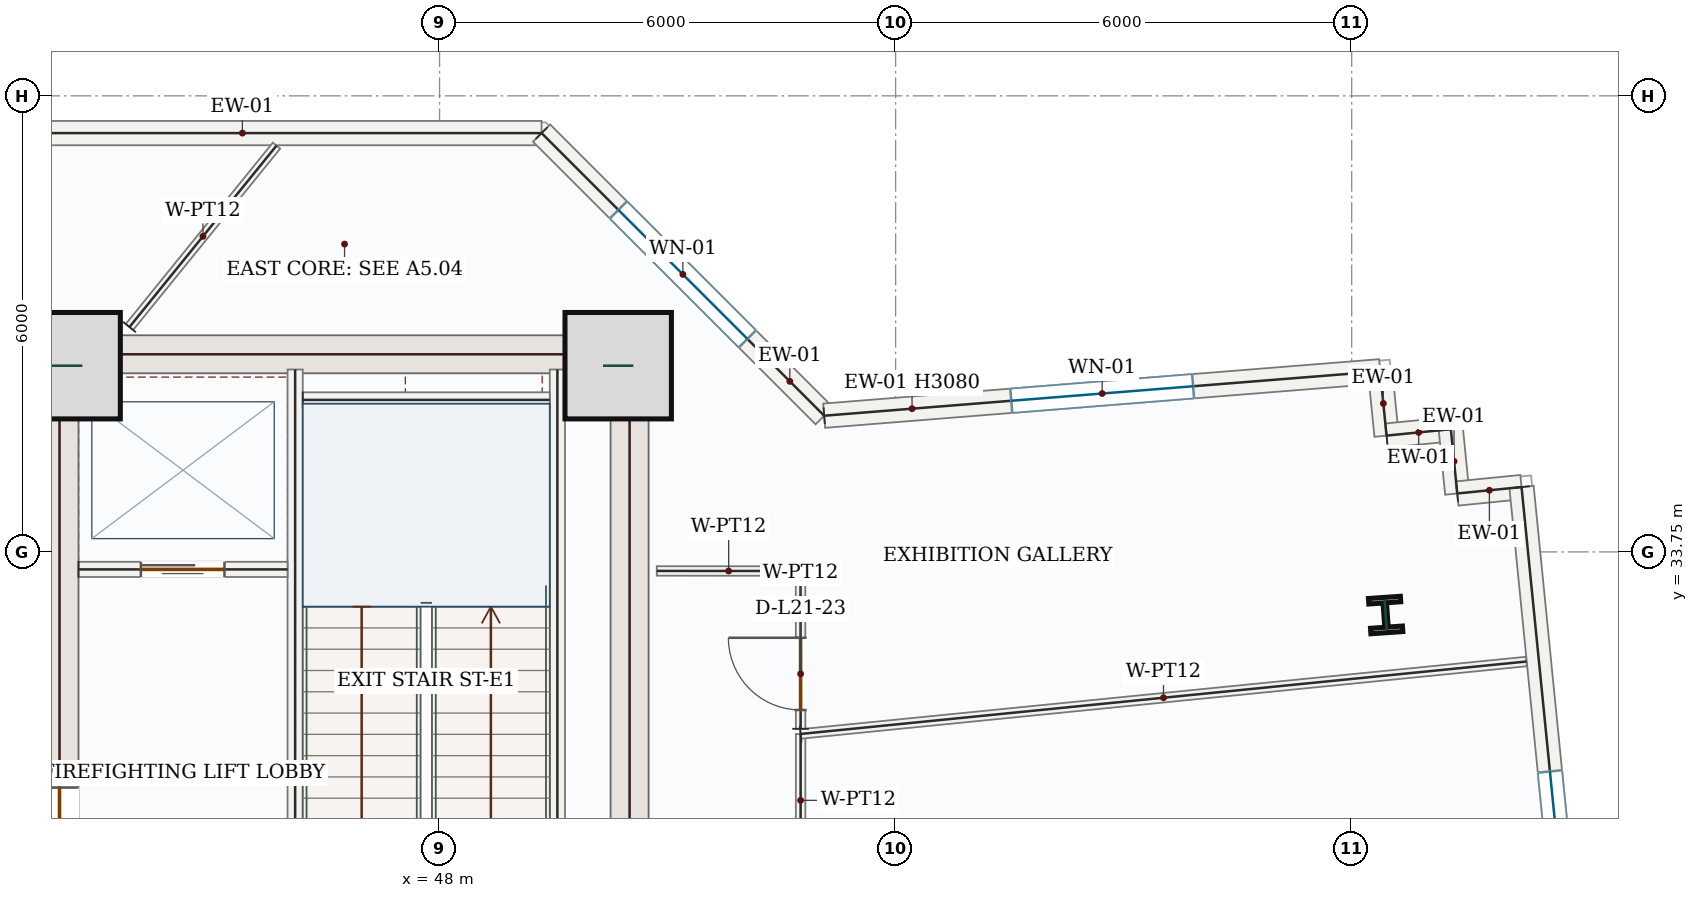
"""IFC4 building model, lengths in metres.
Left out: names, types, materials, properties, quantities, classifications, styles, units other than length and angle.
Written with IfcOpenShell. Run it as: python <this file> out.ifc"""

import sys

from ifc_helpers import new_model, si_unit, direction, frame, frame_2d, origin, origin_2d, place, context, subcontext, project, spatial, rectangle, i_section, extrude, source, transform, mapped, element, fill, save


model = new_model("IFC4")
c1 = context("Model", 3, precision=1e-05, world=origin(), true_north=direction((0.0, 1.0)))
c2 = subcontext(c1, "Body", "Model", "MODEL_VIEW")
j1 = project(units=[si_unit("LENGTHUNIT", "METRE"), si_unit("PLANEANGLEUNIT", "RADIAN")], contexts=[c1])
p1 = place(None, origin())
s1 = spatial("IfcSite", under=j1, at=p1, CompositionType="ELEMENT")
p2 = place(p1, origin())
s2 = spatial("IfcBuilding", under=s1, at=p2, CompositionType="ELEMENT")
p3 = place(p2, frame((0.0, 0.0, 96.3)))
s3 = spatial("IfcBuildingStorey", under=s2, at=p3, CompositionType="ELEMENT", Elevation=96.3)
p4 = place(p3, frame((43.0, 28.05, 0.0), z_axis=(0.0, 0.0, 1.0), x_axis=(0.0, 1.0, 0.0)))
e1 = element("IfcWall", 1, at=p4, inside=s3, PredefinedType="SHEAR", context=c2, shape_type="SweptSolid", body=[
    extrude(rectangle(XDim=8.55, YDim=0.5, at=frame_2d((4.275, 0.0))), origin(), (0.0, 0.0, 1.0), 3.95),
])
p5 = place(p4, frame((1.5, 0.0, 0.0)))
e2 = element("IfcOpeningElement", 2, at=p5, cuts=e1, PredefinedType="OPENING", context=c2, shape_type="SweptSolid", body=[
    extrude(rectangle(XDim=1.1, YDim=2.2, at=frame_2d((0.55, 1.1))), frame((0.0, 0.26, 0.0), z_axis=(0.0, -1.0, 0.0), x_axis=(1.0, 0.0, 0.0)), (0.0, 0.0, 1.0), 0.52),
])
m1 = source(origin(), c2, "Body", "SweptSolid", [
    extrude(rectangle(XDim=8.55, YDim=0.5, at=frame_2d((4.275, 0.0))), origin(), (0.0, 0.0, 1.0), 3.95),
])
p6 = place(p3, frame((50.5, 28.05, 0.0), z_axis=(0.0, 0.0, 1.0), x_axis=(0.0, 1.0, 0.0)))
e3 = element("IfcWall", 3, at=p6, inside=s3, PredefinedType="SHEAR", context=c2, shape_type="MappedRepresentation", body=[
    mapped(m1, transform((0.0, 0.0, 0.0), x_axis=(1.0, 0.0, 0.0), y_axis=(0.0, 1.0, 0.0), z_axis=(0.0, 0.0, 1.0), scale=1.0)),
])
m2 = source(origin(), c2, "Body", "SweptSolid", [
    extrude(rectangle(XDim=7.0, YDim=0.5, at=frame_2d((3.5, 0.0))), origin(), (0.0, 0.0, 1.0), 3.95),
])
p7 = place(p3, frame((43.25, 36.35, 0.0), z_axis=(0.0, 0.0, 1.0), x_axis=(1.0, 0.0, 0.0)))
e4 = element("IfcWall", 4, at=p7, inside=s3, PredefinedType="SHEAR", context=c2, shape_type="MappedRepresentation", body=[
    mapped(m2, transform((0.0, 0.0, 0.0), x_axis=(1.0, 0.0, 0.0), y_axis=(0.0, 1.0, 0.0), z_axis=(0.0, 0.0, 1.0), scale=1.0)),
])
m3 = source(origin(), c2, "Body", "SweptSolid", [
    extrude(rectangle(XDim=1.4, YDim=1.4, at=origin_2d()), origin(), (0.0, 0.0, 1.0), 4.2),
])
for number, where, z_axis, x_axis in (
    (5, (43.1, 36.2, 0.0), (0.0, 0.0, 1.0), (1.0, 0.0, 0.0)),
    (6, (50.35, 36.2, 0.0), (0.0, 0.0, 1.0), (1.0, 0.0, 0.0)),
):
    element("IfcColumn", number, at=place(p3, frame(where, z_axis=z_axis, x_axis=x_axis)), inside=s3, PredefinedType="COLUMN", context=c2, shape_type="MappedRepresentation", body=[
        mapped(m3, transform((0.0, 0.0, 0.0), x_axis=(1.0, 0.0, 0.0), y_axis=(0.0, 1.0, 0.0), z_axis=(0.0, 0.0, 1.0), scale=1.0)),
    ])
m4 = source(origin(), c2, "Body", "SweptSolid", [
    extrude(i_section(OverallWidth=0.421, OverallDepth=0.465, WebThickness=0.045, FlangeThickness=0.073, FilletRadius=0.018, at=origin_2d()), origin(), (0.0, 0.0, 1.0), 4.2),
])
p8 = place(p3, frame((60.447, 32.92, 0.0), z_axis=(0.0, 0.0, 1.0), x_axis=(0.99756405026, 0.069756473744, 0.0)))
e7 = element("IfcColumn", 7, at=p8, inside=s3, PredefinedType="COLUMN", context=c2, shape_type="MappedRepresentation", body=[
    mapped(m4, transform((0.0, 0.0, 0.0), x_axis=(1.0, 0.0, 0.0), y_axis=(0.0, 1.0, 0.0), z_axis=(0.0, 0.0, 1.0), scale=1.0)),
])
m5 = source(origin(), c2, "Body", "SweptSolid", [
    extrude(rectangle(XDim=7.873, YDim=0.32, at=frame_2d((3.936, 0.0))), origin(), (0.0, 0.0, 1.0), 3.95),
])
p9 = place(p3, frame((41.469, 39.26, 0.0), z_axis=(0.0, 0.0, 1.0), x_axis=(1.0, 0.0, 0.0)))
e8 = element("IfcWall", 8, at=p9, inside=s3, PredefinedType="SOLIDWALL", context=c2, shape_type="MappedRepresentation", body=[
    mapped(m5, transform((0.0, 0.0, 0.0), x_axis=(1.0, 0.0, 0.0), y_axis=(0.0, 1.0, 0.0), z_axis=(0.0, 0.0, 1.0), scale=1.0)),
])
p10 = place(p3, frame((49.342, 39.26, 0.0), z_axis=(0.0, 0.0, 1.0), x_axis=(0.707106781187, -0.707106781187, 0.0)))
e9 = element("IfcWall", 9, at=p10, inside=s3, PredefinedType="SOLIDWALL", context=c2, shape_type="SweptSolid", body=[
    extrude(rectangle(XDim=5.258, YDim=0.32, at=frame_2d((2.629, 0.0))), origin(), (0.0, 0.0, 1.0), 3.95),
])
p11 = place(p10, frame((1.429, 0.0, 0.85)))
e10 = element("IfcOpeningElement", 10, at=p11, cuts=e9, PredefinedType="OPENING", context=c2, shape_type="SweptSolid", body=[
    extrude(rectangle(XDim=2.4, YDim=1.8, at=frame_2d((1.2, 0.9))), frame((0.0, 0.17, 0.0), z_axis=(0.0, -1.0, 0.0), x_axis=(1.0, 0.0, 0.0)), (0.0, 0.0, 1.0), 0.34),
])
p12 = place(p3, frame((53.06, 35.542, 0.0), z_axis=(0.0, 0.0, 1.0), x_axis=(0.996827539556, 0.079591811023, 0.0)))
e11 = element("IfcWall", 11, at=p12, inside=s3, PredefinedType="SOLIDWALL", context=c2, shape_type="SweptSolid", body=[
    extrude(rectangle(XDim=7.337, YDim=0.32, at=frame_2d((3.668, 0.0))), origin(), (0.0, 0.0, 1.0), 3.08),
])
p13 = place(p12, frame((2.469, 0.0, 0.85)))
e12 = element("IfcOpeningElement", 12, at=p13, cuts=e11, PredefinedType="OPENING", context=c2, shape_type="SweptSolid", body=[
    extrude(rectangle(XDim=2.4, YDim=1.8, at=frame_2d((1.2, 0.9))), frame((0.0, 0.17, 0.0), z_axis=(0.0, -1.0, 0.0), x_axis=(1.0, 0.0, 0.0)), (0.0, 0.0, 1.0), 0.34),
])
m6 = source(origin(), c2, "Body", "SweptSolid", [
    extrude(rectangle(XDim=0.85, YDim=0.32, at=frame_2d((0.425, 0.0))), origin(), (0.0, 0.0, 1.0), 3.95),
])
p14 = place(p3, frame((60.374, 36.126, 0.0), z_axis=(0.0, 0.0, 1.0), x_axis=(0.09938995433, -0.995048560111, 0.0)))
e13 = element("IfcWall", 13, at=p14, inside=s3, PredefinedType="SOLIDWALL", context=c2, shape_type="MappedRepresentation", body=[
    mapped(m6, transform((0.0, 0.0, 0.0), x_axis=(1.0, 0.0, 0.0), y_axis=(0.0, 1.0, 0.0), z_axis=(0.0, 0.0, 1.0), scale=1.0)),
])
m7 = source(origin(), c2, "Body", "SweptSolid", [
    extrude(rectangle(XDim=0.85, YDim=0.32, at=frame_2d((0.425, 0.0))), origin(), (0.0, 0.0, 1.0), 3.95),
])
p15 = place(p3, frame((60.458, 35.28, 0.0), z_axis=(0.0, 0.0, 1.0), x_axis=(0.995079749343, 0.09907720448, 0.0)))
e14 = element("IfcWall", 14, at=p15, inside=s3, PredefinedType="SOLIDWALL", context=c2, shape_type="MappedRepresentation", body=[
    mapped(m7, transform((0.0, 0.0, 0.0), x_axis=(1.0, 0.0, 0.0), y_axis=(0.0, 1.0, 0.0), z_axis=(0.0, 0.0, 1.0), scale=1.0)),
])
for number, where, z_axis, x_axis in (
    (15, (61.304, 35.365, 0.0), (0.0, 0.0, 1.0), (0.099, -0.995, 0.0)),
    (16, (61.389, 34.519, 0.0), (0.0, 0.0, 1.0), (0.995, 0.099, 0.0)),
):
    element("IfcWall", number, at=place(p3, frame(where, z_axis=z_axis, x_axis=x_axis)), inside=s3, PredefinedType="SOLIDWALL", context=c2, shape_type="MappedRepresentation", body=[
        mapped(m6, transform((0.0, 0.0, 0.0), x_axis=(1.0, 0.0, 0.0), y_axis=(0.0, 1.0, 0.0), z_axis=(0.0, 0.0, 1.0), scale=1.0)),
    ])
p16 = place(p3, frame((62.235, 34.603, 0.0), z_axis=(0.0, 0.0, 1.0), x_axis=(0.099303907908, -0.995057151059, 0.0)))
e17 = element("IfcWall", 17, at=p16, inside=s3, PredefinedType="SOLIDWALL", context=c2, shape_type="SweptSolid", body=[
    extrude(rectangle(XDim=9.92, YDim=0.32, at=frame_2d((4.96, 0.0))), origin(), (0.0, 0.0, 1.0), 3.95),
])
p17 = place(p16, frame((3.76, 0.0, 0.85)))
e18 = element("IfcOpeningElement", 18, at=p17, cuts=e17, PredefinedType="OPENING", context=c2, shape_type="SweptSolid", body=[
    extrude(rectangle(XDim=2.4, YDim=1.8, at=frame_2d((1.2, 0.9))), frame((0.0, 0.17, 0.0), z_axis=(0.0, -1.0, 0.0), x_axis=(1.0, 0.0, 0.0)), (0.0, 0.0, 1.0), 0.34),
])
m8 = source(origin(), c2, "Body", "SweptSolid", [
    extrude(rectangle(XDim=7.87, YDim=0.2, at=frame_2d((3.935, 0.0))), origin(), (0.0, 0.0, 1.0), 3.95),
])
p18 = place(p3, frame((49.55, 28.28, 0.0), z_axis=(0.0, 0.0, 1.0), x_axis=(0.0, 1.0, 0.0)))
e19 = element("IfcWall", 19, at=p18, inside=s3, PredefinedType="SOLIDWALL", context=c2, shape_type="MappedRepresentation", body=[
    mapped(m8, transform((0.0, 0.0, 0.0), x_axis=(1.0, 0.0, 0.0), y_axis=(0.0, 1.0, 0.0), z_axis=(0.0, 0.0, 1.0), scale=1.0)),
])
p19 = place(p3, frame((46.1, 28.15, 0.0), z_axis=(0.0, 0.0, 1.0), x_axis=(0.0, 1.0, 0.0)))
e20 = element("IfcWall", 20, at=p19, inside=s3, PredefinedType="SOLIDWALL", context=c2, shape_type="SweptSolid", body=[
    extrude(rectangle(XDim=8.0, YDim=0.2, at=frame_2d((4.0, 0.0))), origin(), (0.0, 0.0, 1.0), 3.95),
])
p20 = place(p19, frame((0.4, 0.0, 0.0)))
e21 = element("IfcOpeningElement", 21, at=p20, cuts=e20, PredefinedType="OPENING", context=c2, shape_type="SweptSolid", body=[
    extrude(rectangle(XDim=1.05, YDim=2.15, at=frame_2d((0.525, 1.075))), frame((0.0, 0.11, 0.0), z_axis=(0.0, -1.0, 0.0), x_axis=(1.0, 0.0, 0.0)), (0.0, 0.0, 1.0), 0.22),
])
m9 = source(origin(), c2, "Body", "SweptSolid", [
    extrude(rectangle(XDim=3.25, YDim=0.2, at=frame_2d((1.625, 0.0))), origin(), (0.0, 0.0, 1.0), 3.95),
])
p21 = place(p3, frame((46.2, 35.75, 0.0), z_axis=(0.0, 0.0, 1.0), x_axis=(1.0, 0.0, 0.0)))
e22 = element("IfcWall", 22, at=p21, inside=s3, PredefinedType="SOLIDWALL", context=c2, shape_type="MappedRepresentation", body=[
    mapped(m9, transform((0.0, 0.0, 0.0), x_axis=(1.0, 0.0, 0.0), y_axis=(0.0, 1.0, 0.0), z_axis=(0.0, 0.0, 1.0), scale=1.0)),
])
p22 = place(p3, frame((43.25, 33.52, 0.0), z_axis=(0.0, 0.0, 1.0), x_axis=(1.0, 0.0, 0.0)))
e23 = element("IfcWall", 23, at=p22, inside=s3, PredefinedType="SOLIDWALL", context=c2, shape_type="SweptSolid", body=[
    extrude(rectangle(XDim=2.75, YDim=0.2, at=frame_2d((1.375, 0.0))), origin(), (0.0, 0.0, 1.0), 3.95),
])
p23 = place(p22, frame((0.82, 0.0, 0.0)))
e24 = element("IfcOpeningElement", 24, at=p23, cuts=e23, PredefinedType="OPENING", context=c2, shape_type="SweptSolid", body=[
    extrude(rectangle(XDim=1.1, YDim=2.15, at=frame_2d((0.55, 1.075))), frame((0.0, 0.11, 0.0), z_axis=(0.0, -1.0, 0.0), x_axis=(1.0, 0.0, 0.0)), (0.0, 0.0, 1.0), 0.22),
])
p24 = place(p3, frame((52.75, 26.612, 0.0), z_axis=(0.0, 0.0, 1.0), x_axis=(0.0, 1.0, 0.0)))
e25 = element("IfcWall", 25, at=p24, inside=s3, PredefinedType="PARTITIONING", context=c2, shape_type="SweptSolid", body=[
    extrude(rectangle(XDim=4.743, YDim=0.125, at=frame_2d((2.372, 0.0))), origin(), (0.0, 0.0, 1.0), 3.95),
])
p25 = place(p24, frame((1.897, 0.0, 0.0)))
e26 = element("IfcOpeningElement", 26, at=p25, cuts=e25, PredefinedType="OPENING", context=c2, shape_type="SweptSolid", body=[
    extrude(rectangle(XDim=0.95, YDim=2.15, at=frame_2d((0.475, 1.075))), frame((0.0, 0.073, 0.0), z_axis=(0.0, -1.0, 0.0), x_axis=(1.0, 0.0, 0.0)), (0.0, 0.0, 1.0), 0.145),
])
m10 = source(origin(), c2, "Body", "SweptSolid", [
    extrude(rectangle(XDim=9.595, YDim=0.125, at=frame_2d((4.798, 0.0))), origin(), (0.0, 0.0, 1.0), 3.95),
])
p26 = place(p3, frame((52.75, 31.355, 0.0), z_axis=(0.0, 0.0, 1.0), x_axis=(0.995054305912, 0.099332413068, 0.0)))
e27 = element("IfcWall", 27, at=p26, inside=s3, PredefinedType="PARTITIONING", context=c2, shape_type="MappedRepresentation", body=[
    mapped(m10, transform((0.0, 0.0, 0.0), x_axis=(1.0, 0.0, 0.0), y_axis=(0.0, 1.0, 0.0), z_axis=(0.0, 0.0, 1.0), scale=1.0)),
])
m11 = source(origin(), c2, "Body", "SweptSolid", [
    extrude(rectangle(XDim=3.072, YDim=0.125, at=frame_2d((1.536, 0.0))), origin(), (0.0, 0.0, 1.0), 3.95),
])
p27 = place(p3, frame((43.92, 36.709, 0.0), z_axis=(0.0, 0.0, 1.0), x_axis=(0.629760486176, 0.776789373029, 0.0)))
e28 = element("IfcWall", 28, at=p27, inside=s3, PredefinedType="PARTITIONING", context=c2, shape_type="MappedRepresentation", body=[
    mapped(m11, transform((0.0, 0.0, 0.0), x_axis=(1.0, 0.0, 0.0), y_axis=(0.0, 1.0, 0.0), z_axis=(0.0, 0.0, 1.0), scale=1.0)),
])
p28 = place(p3, frame((52.75, 31.423, 0.0), z_axis=(0.0, 0.0, 1.0), x_axis=(-0.000470366834, 0.999999889378, 0.0)))
e29 = element("IfcWall", 29, at=p28, inside=s3, PredefinedType="PARTITIONING", context=c2, shape_type="SweptSolid", body=[
    extrude(rectangle(XDim=2.076, YDim=0.125, at=frame_2d((1.038, 0.0))), origin(), (0.0, 0.0, 1.0), 3.95),
])
p29 = place(p28, frame((0.248, 0.0, 0.0)))
e30 = element("IfcOpeningElement", 30, at=p29, cuts=e29, PredefinedType="OPENING", context=c2, shape_type="SweptSolid", body=[
    extrude(rectangle(XDim=0.95, YDim=2.15, at=frame_2d((0.475, 1.075))), frame((0.0, 0.073, 0.0), z_axis=(0.0, -1.0, 0.0), x_axis=(1.0, 0.0, 0.0)), (0.0, 0.0, 1.0), 0.145),
])
m12 = source(origin(), c2, "Body", "SweptSolid", [
    extrude(rectangle(XDim=1.891, YDim=0.125, at=frame_2d((0.946, 0.0))), origin(), (0.0, 0.0, 1.0), 3.95),
])
p30 = place(p3, frame((52.749, 33.499, 0.0), z_axis=(0.0, 0.0, 1.0), x_axis=(-0.99999992502, 0.000387246647, 0.0)))
e31 = element("IfcWall", 31, at=p30, inside=s3, PredefinedType="PARTITIONING", context=c2, shape_type="MappedRepresentation", body=[
    mapped(m12, transform((0.0, 0.0, 0.0), x_axis=(1.0, 0.0, 0.0), y_axis=(0.0, 1.0, 0.0), z_axis=(0.0, 0.0, 1.0), scale=1.0)),
])
m13 = source(origin(), c2, "Body", "SweptSolid", [
    extrude(rectangle(XDim=2.4, YDim=1.8, at=frame_2d((1.2, 0.9))), frame((0.0, 0.03, 0.0), z_axis=(0.0, -1.0, 0.0), x_axis=(1.0, 0.0, 0.0)), (0.0, 0.0, 1.0), 0.06),
])
p31 = place(p11, origin())
e32 = element("IfcWindow", 32, at=p31, inside=s3, PartitioningType="DOUBLE_PANEL_VERTICAL", PredefinedType="WINDOW", context=c2, shape_type="MappedRepresentation", body=[
    mapped(m13, transform((0.0, 0.0, 0.0), x_axis=(1.0, 0.0, 0.0), y_axis=(0.0, 1.0, 0.0), z_axis=(0.0, 0.0, 1.0), scale=1.0)),
])
fill(e10, e32)
p32 = place(p13, origin())
e33 = element("IfcWindow", 33, at=p32, inside=s3, PartitioningType="DOUBLE_PANEL_VERTICAL", PredefinedType="WINDOW", context=c2, shape_type="MappedRepresentation", body=[
    mapped(m13, transform((0.0, 0.0, 0.0), x_axis=(1.0, 0.0, 0.0), y_axis=(0.0, 1.0, 0.0), z_axis=(0.0, 0.0, 1.0), scale=1.0)),
])
fill(e12, e33)
p33 = place(p17, origin())
e34 = element("IfcWindow", 34, at=p33, inside=s3, PartitioningType="DOUBLE_PANEL_VERTICAL", PredefinedType="WINDOW", context=c2, shape_type="MappedRepresentation", body=[
    mapped(m13, transform((0.0, 0.0, 0.0), x_axis=(1.0, 0.0, 0.0), y_axis=(0.0, 1.0, 0.0), z_axis=(0.0, 0.0, 1.0), scale=1.0)),
])
fill(e18, e34)
m14 = source(origin(), c2, "Body", "SweptSolid", [
    extrude(rectangle(XDim=1.1, YDim=2.15, at=frame_2d((0.55, 1.075))), frame((0.0, 0.025, 0.0), z_axis=(0.0, -1.0, 0.0), x_axis=(1.0, 0.0, 0.0)), (0.0, 0.0, 1.0), 0.05),
])
p34 = place(p23, origin())
e35 = element("IfcDoor", 35, at=p34, inside=s3, OperationType="DOUBLE_DOOR_SLIDING", PredefinedType="DOOR", context=c2, shape_type="MappedRepresentation", body=[
    mapped(m14, transform((0.0, 0.0, 0.0), x_axis=(1.0, 0.0, 0.0), y_axis=(0.0, 1.0, 0.0), z_axis=(0.0, 0.0, 1.0), scale=1.0)),
])
fill(e24, e35)
m15 = source(origin(), c2, "Body", "SweptSolid", [
    extrude(rectangle(XDim=1.1, YDim=2.2, at=frame_2d((0.55, 1.1))), frame((0.0, 0.025, 0.0), z_axis=(0.0, -1.0, 0.0), x_axis=(1.0, 0.0, 0.0)), (0.0, 0.0, 1.0), 0.05),
])
p35 = place(p5, origin())
e36 = element("IfcDoor", 36, at=p35, inside=s3, OperationType="SINGLE_SWING_LEFT", PredefinedType="DOOR", context=c2, shape_type="MappedRepresentation", body=[
    mapped(m15, transform((0.0, 0.0, 0.0), x_axis=(1.0, 0.0, 0.0), y_axis=(0.0, 1.0, 0.0), z_axis=(0.0, 0.0, 1.0), scale=1.0)),
])
fill(e2, e36)
m16 = source(origin(), c2, "Body", "SweptSolid", [
    extrude(rectangle(XDim=0.95, YDim=2.15, at=frame_2d((0.475, 1.075))), frame((0.0, 0.025, 0.0), z_axis=(0.0, -1.0, 0.0), x_axis=(1.0, 0.0, 0.0)), (0.0, 0.0, 1.0), 0.05),
])
p36 = place(p29, origin())
e37 = element("IfcDoor", 37, at=p36, inside=s3, OperationType="SINGLE_SWING_RIGHT", PredefinedType="DOOR", context=c2, shape_type="MappedRepresentation", body=[
    mapped(m16, transform((0.0, 0.0, 0.0), x_axis=(1.0, 0.0, 0.0), y_axis=(0.0, 1.0, 0.0), z_axis=(0.0, 0.0, 1.0), scale=1.0)),
])
fill(e30, e37)
save(model, sys.argv[1])
